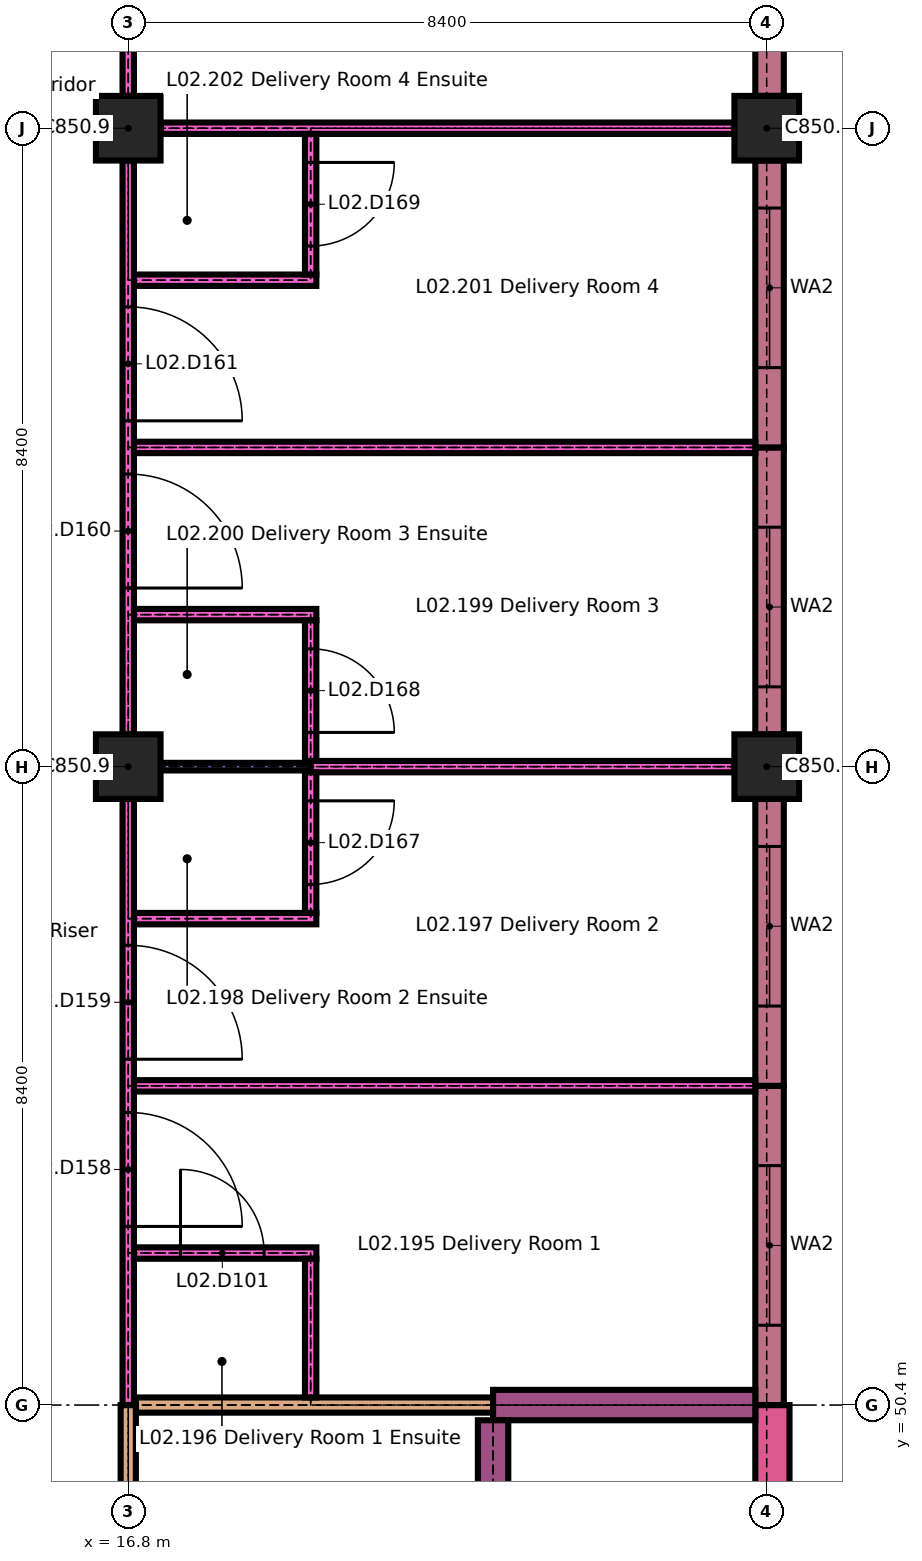
"""IFC4 building model, lengths in metres.
Left out: names, types, materials, properties, quantities, classifications, styles, units other than length and angle.
Written with IfcOpenShell. Run it as: python <this file> out.ifc"""

import sys

from ifc_helpers import new_model, si_unit, direction, frame, frame_2d, origin, origin_2d, place, context, subcontext, project, spatial, rectangle, extrude, element, fill, save


model = new_model("IFC4")
c1 = context("Model", 3, precision=1e-05, world=origin(), true_north=direction((0.0, 1.0)))
c2 = subcontext(c1, "Body", "Model", "MODEL_VIEW")
j1 = project(units=[si_unit("LENGTHUNIT", "METRE"), si_unit("PLANEANGLEUNIT", "RADIAN")], contexts=[c1])
p1 = place(None, origin())
s1 = spatial("IfcSite", under=j1, at=p1, CompositionType="ELEMENT")
p2 = place(p1, origin())
s2 = spatial("IfcBuilding", under=s1, at=p2, CompositionType="ELEMENT")
p3 = place(p2, frame((0.0, 0.0, 8.4)))
s3 = spatial("IfcBuildingStorey", under=s2, at=p3, CompositionType="ELEMENT", Elevation=8.4)
for number, where, z_axis, x_axis in (
    (1, (16.8, 58.8, 0.0), (0.0, 0.0, 1.0), (1.0, 0.0, 0.0)),
    (2, (25.2, 58.8, 0.0), (0.0, 0.0, 1.0), (1.0, 0.0, 0.0)),
    (3, (16.8, 67.2, 0.0), (0.0, 0.0, 1.0), (1.0, 0.0, 0.0)),
    (4, (25.2, 67.2, 0.0), (0.0, 0.0, 1.0), (1.0, 0.0, 0.0)),
):
    element("IfcColumn", number, at=place(p3, frame(where, z_axis=z_axis, x_axis=x_axis)), inside=s3, PredefinedType="COLUMN", context=c2, shape_type="SweptSolid", body=[
        extrude(rectangle(XDim=0.85, YDim=0.85, at=origin_2d()), origin(), (0.0, 0.0, 1.0), 4.2),
    ])
p4 = place(p3, frame((25.275, 46.55, 0.0), z_axis=(0.0, 0.0, 1.0), x_axis=(0.0, 1.0, 0.0)))
e5 = element("IfcWall", 5, at=p4, inside=s3, PredefinedType="SOLIDWALL", context=c2, shape_type="SweptSolid", body=[
    extrude(rectangle(XDim=3.85, YDim=0.45, at=frame_2d((1.925, 0.0))), origin(), (0.0, 0.0, 1.0), 4.2),
])
p5 = place(p3, frame((25.238, 50.4, 0.0), z_axis=(0.0, 0.0, 1.0), x_axis=(0.0, 1.0, 0.0)))
e6 = element("IfcWall", 6, at=p5, inside=s3, PredefinedType="SOLIDWALL", context=c2, shape_type="SweptSolid", body=[
    extrude(rectangle(XDim=4.2, YDim=0.375, at=frame_2d((2.1, 0.0))), origin(), (0.0, 0.0, 1.0), 3.9),
])
p6 = place(p5, frame((1.05, 0.0, 0.9)))
e7 = element("IfcOpeningElement", 7, at=p6, cuts=e6, PredefinedType="OPENING", context=c2, shape_type="SweptSolid", body=[
    extrude(rectangle(XDim=2.1, YDim=2.1, at=frame_2d((1.05, 1.05))), frame((0.0, 0.198, 0.0), z_axis=(0.0, -1.0, 0.0), x_axis=(1.0, 0.0, 0.0)), (0.0, 0.0, 1.0), 0.395),
])
p7 = place(p3, frame((25.238, 54.6, 0.0), z_axis=(0.0, 0.0, 1.0), x_axis=(0.0, 1.0, 0.0)))
e8 = element("IfcWall", 8, at=p7, inside=s3, PredefinedType="SOLIDWALL", context=c2, shape_type="SweptSolid", body=[
    extrude(rectangle(XDim=3.775, YDim=0.375, at=frame_2d((1.887, 0.0))), origin(), (0.0, 0.0, 1.0), 3.9),
])
p8 = place(p7, frame((1.05, 0.0, 0.9)))
e9 = element("IfcOpeningElement", 9, at=p8, cuts=e8, PredefinedType="OPENING", context=c2, shape_type="SweptSolid", body=[
    extrude(rectangle(XDim=2.1, YDim=2.1, at=frame_2d((1.05, 1.05))), frame((0.0, 0.198, 0.0), z_axis=(0.0, -1.0, 0.0), x_axis=(1.0, 0.0, 0.0)), (0.0, 0.0, 1.0), 0.395),
])
p9 = place(p3, frame((25.238, 59.225, 0.0), z_axis=(0.0, 0.0, 1.0), x_axis=(0.0, 1.0, 0.0)))
e10 = element("IfcWall", 10, at=p9, inside=s3, PredefinedType="SOLIDWALL", context=c2, shape_type="SweptSolid", body=[
    extrude(rectangle(XDim=3.775, YDim=0.375, at=frame_2d((1.887, 0.0))), origin(), (0.0, 0.0, 1.0), 3.9),
])
p10 = place(p9, frame((0.625, 0.0, 0.9)))
e11 = element("IfcOpeningElement", 11, at=p10, cuts=e10, PredefinedType="OPENING", context=c2, shape_type="SweptSolid", body=[
    extrude(rectangle(XDim=2.1, YDim=2.1, at=frame_2d((1.05, 1.05))), frame((0.0, 0.198, 0.0), z_axis=(0.0, -1.0, 0.0), x_axis=(1.0, 0.0, 0.0)), (0.0, 0.0, 1.0), 0.395),
])
p11 = place(p3, frame((25.238, 63.0, 0.0), z_axis=(0.0, 0.0, 1.0), x_axis=(0.0, 1.0, 0.0)))
e12 = element("IfcWall", 12, at=p11, inside=s3, PredefinedType="SOLIDWALL", context=c2, shape_type="SweptSolid", body=[
    extrude(rectangle(XDim=3.775, YDim=0.375, at=frame_2d((1.887, 0.0))), origin(), (0.0, 0.0, 1.0), 3.9),
])
p12 = place(p11, frame((1.05, 0.0, 0.9)))
e13 = element("IfcOpeningElement", 13, at=p12, cuts=e12, PredefinedType="OPENING", context=c2, shape_type="SweptSolid", body=[
    extrude(rectangle(XDim=2.1, YDim=2.1, at=frame_2d((1.05, 1.05))), frame((0.0, 0.198, 0.0), z_axis=(0.0, -1.0, 0.0), x_axis=(1.0, 0.0, 0.0)), (0.0, 0.0, 1.0), 0.395),
])
p13 = place(p3, frame((25.238, 67.625, 0.0), z_axis=(0.0, 0.0, 1.0), x_axis=(0.0, 1.0, 0.0)))
e14 = element("IfcWall", 14, at=p13, inside=s3, PredefinedType="SOLIDWALL", context=c2, shape_type="SweptSolid", body=[
    extrude(rectangle(XDim=4.575, YDim=0.375, at=frame_2d((2.288, 0.0))), origin(), (0.0, 0.0, 1.0), 3.9),
])
p14 = place(p3, frame((16.9, 50.4, 0.0), z_axis=(0.0, 0.0, 1.0), x_axis=(1.0, 0.0, 0.0)))
e15 = element("IfcWall", 15, at=p14, inside=s3, PredefinedType="PARTITIONING", context=c2, shape_type="SweptSolid", body=[
    extrude(rectangle(XDim=4.7, YDim=0.2, at=frame_2d((2.35, 0.0))), origin(), (0.0, 0.0, 1.0), 4.2),
])
p15 = place(p3, frame((21.6, 50.4, 0.0), z_axis=(0.0, 0.0, 1.0), x_axis=(1.0, 0.0, 0.0)))
e16 = element("IfcWall", 16, at=p15, inside=s3, PredefinedType="SHEAR", context=c2, shape_type="SweptSolid", body=[
    extrude(rectangle(XDim=3.45, YDim=0.4, at=frame_2d((1.725, 0.0))), origin(), (0.0, 0.0, 1.0), 4.2),
])
p16 = place(p3, frame((16.875, 52.4, 0.0), z_axis=(0.0, 0.0, 1.0), x_axis=(1.0, 0.0, 0.0)))
e17 = element("IfcWall", 17, at=p16, inside=s3, PredefinedType="PARTITIONING", context=c2, shape_type="SweptSolid", body=[
    extrude(rectangle(XDim=2.4, YDim=0.15, at=frame_2d((1.2, 0.0))), origin(), (0.0, 0.0, 1.0), 4.2),
])
p17 = place(p16, frame((0.613, 0.0, 0.0)))
e18 = element("IfcOpeningElement", 18, at=p17, cuts=e17, PredefinedType="OPENING", context=c2, shape_type="SweptSolid", body=[
    extrude(rectangle(XDim=1.1, YDim=2.1, at=frame_2d((0.55, 1.05))), frame((0.0, 0.085, 0.0), z_axis=(0.0, -1.0, 0.0), x_axis=(1.0, 0.0, 0.0)), (0.0, 0.0, 1.0), 0.17),
])
p18 = place(p3, frame((16.875, 54.6, 0.0), z_axis=(0.0, 0.0, 1.0), x_axis=(1.0, 0.0, 0.0)))
e19 = element("IfcWall", 19, at=p18, inside=s3, PredefinedType="PARTITIONING", context=c2, shape_type="SweptSolid", body=[
    extrude(rectangle(XDim=8.175, YDim=0.15, at=frame_2d((4.087, 0.0))), origin(), (0.0, 0.0, 1.0), 4.2),
])
p19 = place(p3, frame((16.875, 56.8, 0.0), z_axis=(0.0, 0.0, 1.0), x_axis=(1.0, 0.0, 0.0)))
e20 = element("IfcWall", 20, at=p19, inside=s3, PredefinedType="PARTITIONING", context=c2, shape_type="SweptSolid", body=[
    extrude(rectangle(XDim=2.4, YDim=0.15, at=frame_2d((1.2, 0.0))), origin(), (0.0, 0.0, 1.0), 4.2),
])
p20 = place(p3, frame((17.225, 58.8, 0.0), z_axis=(0.0, 0.0, 1.0), x_axis=(1.0, 0.0, 0.0)))
e21 = element("IfcWall", 21, at=p20, inside=s3, PredefinedType="PARTITIONING", context=c2, shape_type="SweptSolid", body=[
    extrude(rectangle(XDim=1.975, YDim=0.1, at=frame_2d((0.987, 0.0))), origin(), (0.0, 0.0, 1.0), 4.2),
])
p21 = place(p3, frame((19.2, 58.8, 0.0), z_axis=(0.0, 0.0, 1.0), x_axis=(1.0, 0.0, 0.0)))
e22 = element("IfcWall", 22, at=p21, inside=s3, PredefinedType="PARTITIONING", context=c2, shape_type="SweptSolid", body=[
    extrude(rectangle(XDim=5.575, YDim=0.15, at=frame_2d((2.788, 0.0))), origin(), (0.0, 0.0, 1.0), 4.2),
])
p22 = place(p3, frame((16.875, 60.8, 0.0), z_axis=(0.0, 0.0, 1.0), x_axis=(1.0, 0.0, 0.0)))
e23 = element("IfcWall", 23, at=p22, inside=s3, PredefinedType="PARTITIONING", context=c2, shape_type="SweptSolid", body=[
    extrude(rectangle(XDim=2.4, YDim=0.15, at=frame_2d((1.2, 0.0))), origin(), (0.0, 0.0, 1.0), 4.2),
])
p23 = place(p3, frame((16.875, 63.0, 0.0), z_axis=(0.0, 0.0, 1.0), x_axis=(1.0, 0.0, 0.0)))
e24 = element("IfcWall", 24, at=p23, inside=s3, PredefinedType="PARTITIONING", context=c2, shape_type="SweptSolid", body=[
    extrude(rectangle(XDim=8.175, YDim=0.15, at=frame_2d((4.087, 0.0))), origin(), (0.0, 0.0, 1.0), 4.2),
])
p24 = place(p3, frame((16.875, 65.2, 0.0), z_axis=(0.0, 0.0, 1.0), x_axis=(1.0, 0.0, 0.0)))
e25 = element("IfcWall", 25, at=p24, inside=s3, PredefinedType="PARTITIONING", context=c2, shape_type="SweptSolid", body=[
    extrude(rectangle(XDim=2.4, YDim=0.15, at=frame_2d((1.2, 0.0))), origin(), (0.0, 0.0, 1.0), 4.2),
])
p25 = place(p3, frame((17.225, 67.2, 0.0), z_axis=(0.0, 0.0, 1.0), x_axis=(1.0, 0.0, 0.0)))
e26 = element("IfcWall", 26, at=p25, inside=s3, PredefinedType="PARTITIONING", context=c2, shape_type="SweptSolid", body=[
    extrude(rectangle(XDim=7.55, YDim=0.15, at=frame_2d((3.775, 0.0))), origin(), (0.0, 0.0, 1.0), 4.2),
])
p26 = place(p3, frame((16.8, 42.0, 0.0), z_axis=(0.0, 0.0, 1.0), x_axis=(0.0, 1.0, 0.0)))
e27 = element("IfcWall", 27, at=p26, inside=s3, PredefinedType="PARTITIONING", context=c2, shape_type="SweptSolid", body=[
    extrude(rectangle(XDim=8.4, YDim=0.2, at=frame_2d((4.2, 0.0))), origin(), (0.0, 0.0, 1.0), 4.2),
])
p27 = place(p26, frame((3.5, 0.0, 0.0)))
e28 = element("IfcOpeningElement", 28, at=p27, cuts=e27, PredefinedType="OPENING", context=c2, shape_type="SweptSolid", body=[
    extrude(rectangle(XDim=1.4, YDim=2.1, at=frame_2d((0.7, 1.05))), frame((0.0, 0.11, 0.0), z_axis=(0.0, -1.0, 0.0), x_axis=(1.0, 0.0, 0.0)), (0.0, 0.0, 1.0), 0.22),
])
p28 = place(p3, frame((16.8, 50.4, 0.0), z_axis=(0.0, 0.0, 1.0), x_axis=(0.0, 1.0, 0.0)))
e29 = element("IfcWall", 29, at=p28, inside=s3, PredefinedType="PARTITIONING", context=c2, shape_type="SweptSolid", body=[
    extrude(rectangle(XDim=7.975, YDim=0.15, at=frame_2d((3.988, 0.0))), origin(), (0.0, 0.0, 1.0), 4.2),
])
p29 = place(p28, frame((2.35, 0.0, 0.0)))
e30 = element("IfcOpeningElement", 30, at=p29, cuts=e29, PredefinedType="OPENING", context=c2, shape_type="SweptSolid", body=[
    extrude(rectangle(XDim=1.5, YDim=2.4, at=frame_2d((0.75, 1.2))), frame((0.0, 0.085, 0.0), z_axis=(0.0, -1.0, 0.0), x_axis=(1.0, 0.0, 0.0)), (0.0, 0.0, 1.0), 0.17),
])
p30 = place(p28, frame((4.55, 0.0, 0.0)))
e31 = element("IfcOpeningElement", 31, at=p30, cuts=e29, PredefinedType="OPENING", context=c2, shape_type="SweptSolid", body=[
    extrude(rectangle(XDim=1.5, YDim=2.4, at=frame_2d((0.75, 1.2))), frame((0.0, 0.085, 0.0), z_axis=(0.0, -1.0, 0.0), x_axis=(1.0, 0.0, 0.0)), (0.0, 0.0, 1.0), 0.17),
])
p31 = place(p3, frame((16.8, 59.225, 0.0), z_axis=(0.0, 0.0, 1.0), x_axis=(0.0, 1.0, 0.0)))
e32 = element("IfcWall", 32, at=p31, inside=s3, PredefinedType="PARTITIONING", context=c2, shape_type="SweptSolid", body=[
    extrude(rectangle(XDim=7.55, YDim=0.15, at=frame_2d((3.775, 0.0))), origin(), (0.0, 0.0, 1.0), 4.2),
])
p32 = place(p31, frame((1.925, 0.0, 0.0)))
e33 = element("IfcOpeningElement", 33, at=p32, cuts=e32, PredefinedType="OPENING", context=c2, shape_type="SweptSolid", body=[
    extrude(rectangle(XDim=1.5, YDim=2.4, at=frame_2d((0.75, 1.2))), frame((0.0, 0.085, 0.0), z_axis=(0.0, -1.0, 0.0), x_axis=(1.0, 0.0, 0.0)), (0.0, 0.0, 1.0), 0.17),
])
p33 = place(p31, frame((4.125, 0.0, 0.0)))
e34 = element("IfcOpeningElement", 34, at=p33, cuts=e32, PredefinedType="OPENING", context=c2, shape_type="SweptSolid", body=[
    extrude(rectangle(XDim=1.5, YDim=2.4, at=frame_2d((0.75, 1.2))), frame((0.0, 0.085, 0.0), z_axis=(0.0, -1.0, 0.0), x_axis=(1.0, 0.0, 0.0)), (0.0, 0.0, 1.0), 0.17),
])
p34 = place(p3, frame((16.8, 67.625, 0.0), z_axis=(0.0, 0.0, 1.0), x_axis=(0.0, 1.0, 0.0)))
e35 = element("IfcWall", 35, at=p34, inside=s3, PredefinedType="PARTITIONING", context=c2, shape_type="SweptSolid", body=[
    extrude(rectangle(XDim=7.975, YDim=0.15, at=frame_2d((3.988, 0.0))), origin(), (0.0, 0.0, 1.0), 4.2),
])
p35 = place(p34, frame((5.275, 0.0, 0.0)))
e36 = element("IfcOpeningElement", 36, at=p35, cuts=e35, PredefinedType="OPENING", context=c2, shape_type="SweptSolid", body=[
    extrude(rectangle(XDim=2.0, YDim=2.4, at=frame_2d((1.0, 1.2))), frame((0.0, 0.085, 0.0), z_axis=(0.0, -1.0, 0.0), x_axis=(1.0, 0.0, 0.0)), (0.0, 0.0, 1.0), 0.17),
])
p36 = place(p3, frame((19.2, 50.5, 0.0), z_axis=(0.0, 0.0, 1.0), x_axis=(0.0, 1.0, 0.0)))
e37 = element("IfcWall", 37, at=p36, inside=s3, PredefinedType="PARTITIONING", context=c2, shape_type="SweptSolid", body=[
    extrude(rectangle(XDim=1.825, YDim=0.15, at=frame_2d((0.913, 0.0))), origin(), (0.0, 0.0, 1.0), 4.2),
])
p37 = place(p3, frame((19.2, 56.875, 0.0), z_axis=(0.0, 0.0, 1.0), x_axis=(0.0, 1.0, 0.0)))
e38 = element("IfcWall", 38, at=p37, inside=s3, PredefinedType="PARTITIONING", context=c2, shape_type="SweptSolid", body=[
    extrude(rectangle(XDim=1.85, YDim=0.15, at=frame_2d((0.925, 0.0))), origin(), (0.0, 0.0, 1.0), 4.2),
])
p38 = place(p37, frame((0.375, 0.0, 0.0)))
e39 = element("IfcOpeningElement", 39, at=p38, cuts=e38, PredefinedType="OPENING", context=c2, shape_type="SweptSolid", body=[
    extrude(rectangle(XDim=1.1, YDim=2.1, at=frame_2d((0.55, 1.05))), frame((0.0, 0.085, 0.0), z_axis=(0.0, -1.0, 0.0), x_axis=(1.0, 0.0, 0.0)), (0.0, 0.0, 1.0), 0.17),
])
p39 = place(p3, frame((19.2, 58.875, 0.0), z_axis=(0.0, 0.0, 1.0), x_axis=(0.0, 1.0, 0.0)))
e40 = element("IfcWall", 40, at=p39, inside=s3, PredefinedType="PARTITIONING", context=c2, shape_type="SweptSolid", body=[
    extrude(rectangle(XDim=1.85, YDim=0.15, at=frame_2d((0.925, 0.0))), origin(), (0.0, 0.0, 1.0), 4.2),
])
p40 = place(p39, frame((0.375, 0.0, 0.0)))
e41 = element("IfcOpeningElement", 41, at=p40, cuts=e40, PredefinedType="OPENING", context=c2, shape_type="SweptSolid", body=[
    extrude(rectangle(XDim=1.1, YDim=2.1, at=frame_2d((0.55, 1.05))), frame((0.0, 0.085, 0.0), z_axis=(0.0, -1.0, 0.0), x_axis=(1.0, 0.0, 0.0)), (0.0, 0.0, 1.0), 0.17),
])
p41 = place(p3, frame((19.2, 65.275, 0.0), z_axis=(0.0, 0.0, 1.0), x_axis=(0.0, 1.0, 0.0)))
e42 = element("IfcWall", 42, at=p41, inside=s3, PredefinedType="PARTITIONING", context=c2, shape_type="SweptSolid", body=[
    extrude(rectangle(XDim=1.85, YDim=0.15, at=frame_2d((0.925, 0.0))), origin(), (0.0, 0.0, 1.0), 4.2),
])
p42 = place(p41, frame((0.375, 0.0, 0.0)))
e43 = element("IfcOpeningElement", 43, at=p42, cuts=e42, PredefinedType="OPENING", context=c2, shape_type="SweptSolid", body=[
    extrude(rectangle(XDim=1.1, YDim=2.1, at=frame_2d((0.55, 1.05))), frame((0.0, 0.085, 0.0), z_axis=(0.0, -1.0, 0.0), x_axis=(1.0, 0.0, 0.0)), (0.0, 0.0, 1.0), 0.17),
])
p43 = place(p3, frame((21.6, 42.2, 0.0), z_axis=(0.0, 0.0, 1.0), x_axis=(0.0, 1.0, 0.0)))
e44 = element("IfcWall", 44, at=p43, inside=s3, PredefinedType="SHEAR", context=c2, shape_type="SweptSolid", body=[
    extrude(rectangle(XDim=8.0, YDim=0.4, at=frame_2d((4.0, 0.0))), origin(), (0.0, 0.0, 1.0), 4.2),
])
p44 = place(p43, frame((0.4, 0.0, 0.0)))
e45 = element("IfcOpeningElement", 45, at=p44, cuts=e44, PredefinedType="OPENING", context=c2, shape_type="SweptSolid", body=[
    extrude(rectangle(XDim=1.2, YDim=2.1, at=frame_2d((0.6, 1.05))), frame((0.0, 0.21, 0.0), z_axis=(0.0, -1.0, 0.0), x_axis=(1.0, 0.0, 0.0)), (0.0, 0.0, 1.0), 0.42),
])
p45 = place(p6, origin())
e46 = element("IfcWindow", 46, at=p45, inside=s3, PartitioningType="DOUBLE_PANEL_VERTICAL", PredefinedType="WINDOW", context=c2, shape_type="SweptSolid", body=[
    extrude(rectangle(XDim=2.1, YDim=2.1, at=frame_2d((1.05, 1.05))), frame((0.0, 0.03, 0.0), z_axis=(0.0, -1.0, 0.0), x_axis=(1.0, 0.0, 0.0)), (0.0, 0.0, 1.0), 0.06),
])
fill(e7, e46)
p46 = place(p8, origin())
e47 = element("IfcWindow", 47, at=p46, inside=s3, PartitioningType="DOUBLE_PANEL_VERTICAL", PredefinedType="WINDOW", context=c2, shape_type="SweptSolid", body=[
    extrude(rectangle(XDim=2.1, YDim=2.1, at=frame_2d((1.05, 1.05))), frame((0.0, 0.03, 0.0), z_axis=(0.0, -1.0, 0.0), x_axis=(1.0, 0.0, 0.0)), (0.0, 0.0, 1.0), 0.06),
])
fill(e9, e47)
p47 = place(p10, origin())
e48 = element("IfcWindow", 48, at=p47, inside=s3, PartitioningType="DOUBLE_PANEL_VERTICAL", PredefinedType="WINDOW", context=c2, shape_type="SweptSolid", body=[
    extrude(rectangle(XDim=2.1, YDim=2.1, at=frame_2d((1.05, 1.05))), frame((0.0, 0.03, 0.0), z_axis=(0.0, -1.0, 0.0), x_axis=(1.0, 0.0, 0.0)), (0.0, 0.0, 1.0), 0.06),
])
fill(e11, e48)
p48 = place(p12, origin())
e49 = element("IfcWindow", 49, at=p48, inside=s3, PartitioningType="DOUBLE_PANEL_VERTICAL", PredefinedType="WINDOW", context=c2, shape_type="SweptSolid", body=[
    extrude(rectangle(XDim=2.1, YDim=2.1, at=frame_2d((1.05, 1.05))), frame((0.0, 0.03, 0.0), z_axis=(0.0, -1.0, 0.0), x_axis=(1.0, 0.0, 0.0)), (0.0, 0.0, 1.0), 0.06),
])
fill(e13, e49)
p49 = place(p17, origin())
e50 = element("IfcDoor", 50, at=p49, inside=s3, OperationType="SINGLE_SWING_RIGHT", PredefinedType="DOOR", context=c2, shape_type="SweptSolid", body=[
    extrude(rectangle(XDim=1.1, YDim=2.1, at=frame_2d((0.55, 1.05))), frame((0.0, 0.025, 0.0), z_axis=(0.0, -1.0, 0.0), x_axis=(1.0, 0.0, 0.0)), (0.0, 0.0, 1.0), 0.05),
])
fill(e18, e50)
p50 = place(p29, origin())
e51 = element("IfcDoor", 51, at=p50, inside=s3, OperationType="SINGLE_SWING_LEFT", PredefinedType="DOOR", context=c2, shape_type="SweptSolid", body=[
    extrude(rectangle(XDim=1.5, YDim=2.4, at=frame_2d((0.75, 1.2))), frame((0.0, 0.03, 0.0), z_axis=(0.0, -1.0, 0.0), x_axis=(1.0, 0.0, 0.0)), (0.0, 0.0, 1.0), 0.06),
])
fill(e30, e51)
p51 = place(p30, origin())
e52 = element("IfcDoor", 52, at=p51, inside=s3, OperationType="SINGLE_SWING_LEFT", PredefinedType="DOOR", context=c2, shape_type="SweptSolid", body=[
    extrude(rectangle(XDim=1.5, YDim=2.4, at=frame_2d((0.75, 1.2))), frame((0.0, 0.03, 0.0), z_axis=(0.0, -1.0, 0.0), x_axis=(1.0, 0.0, 0.0)), (0.0, 0.0, 1.0), 0.06),
])
fill(e31, e52)
p52 = place(p32, origin())
e53 = element("IfcDoor", 53, at=p52, inside=s3, OperationType="SINGLE_SWING_LEFT", PredefinedType="DOOR", context=c2, shape_type="SweptSolid", body=[
    extrude(rectangle(XDim=1.5, YDim=2.4, at=frame_2d((0.75, 1.2))), frame((0.0, 0.03, 0.0), z_axis=(0.0, -1.0, 0.0), x_axis=(1.0, 0.0, 0.0)), (0.0, 0.0, 1.0), 0.06),
])
fill(e33, e53)
p53 = place(p33, origin())
e54 = element("IfcDoor", 54, at=p53, inside=s3, OperationType="SINGLE_SWING_LEFT", PredefinedType="DOOR", context=c2, shape_type="SweptSolid", body=[
    extrude(rectangle(XDim=1.5, YDim=2.4, at=frame_2d((0.75, 1.2))), frame((0.0, 0.03, 0.0), z_axis=(0.0, -1.0, 0.0), x_axis=(1.0, 0.0, 0.0)), (0.0, 0.0, 1.0), 0.06),
])
fill(e34, e54)
p54 = place(p38, origin())
e55 = element("IfcDoor", 55, at=p54, inside=s3, OperationType="SINGLE_SWING_RIGHT", PredefinedType="DOOR", context=c2, shape_type="SweptSolid", body=[
    extrude(rectangle(XDim=1.1, YDim=2.1, at=frame_2d((0.55, 1.05))), frame((0.0, 0.025, 0.0), z_axis=(0.0, -1.0, 0.0), x_axis=(1.0, 0.0, 0.0)), (0.0, 0.0, 1.0), 0.05),
])
fill(e39, e55)
p55 = place(p40, origin())
e56 = element("IfcDoor", 56, at=p55, inside=s3, OperationType="SINGLE_SWING_LEFT", PredefinedType="DOOR", context=c2, shape_type="SweptSolid", body=[
    extrude(rectangle(XDim=1.1, YDim=2.1, at=frame_2d((0.55, 1.05))), frame((0.0, 0.025, 0.0), z_axis=(0.0, -1.0, 0.0), x_axis=(1.0, 0.0, 0.0)), (0.0, 0.0, 1.0), 0.05),
])
fill(e41, e56)
p56 = place(p42, origin())
e57 = element("IfcDoor", 57, at=p56, inside=s3, OperationType="SINGLE_SWING_RIGHT", PredefinedType="DOOR", context=c2, shape_type="SweptSolid", body=[
    extrude(rectangle(XDim=1.1, YDim=2.1, at=frame_2d((0.55, 1.05))), frame((0.0, 0.025, 0.0), z_axis=(0.0, -1.0, 0.0), x_axis=(1.0, 0.0, 0.0)), (0.0, 0.0, 1.0), 0.05),
])
fill(e43, e57)
save(model, sys.argv[1])
